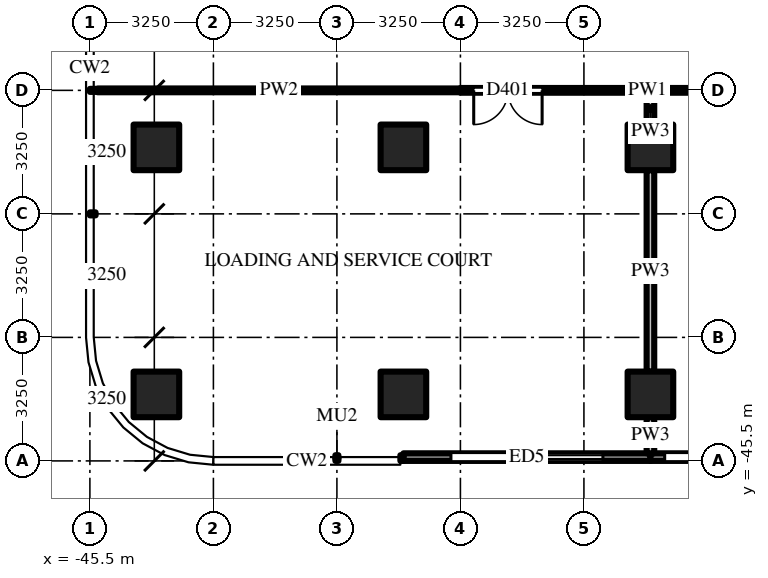
"""IFC4 building model, lengths in metres.
Left out: names, types, materials, properties, quantities, classifications, styles, units other than length and angle.
Written with IfcOpenShell. Run it as: python <this file> out.ifc"""

import sys

from ifc_helpers import new_model, si_unit, direction, frame, frame_2d, origin, origin_2d, place, context, subcontext, project, spatial, rectangle, extrude, source, transform, mapped, element, fill, save


model = new_model("IFC4")
c1 = context("Model", 3, precision=1e-05, world=origin(), true_north=direction((0.0, 1.0)))
c2 = subcontext(c1, "Body", "Model", "MODEL_VIEW")
j1 = project(units=[si_unit("LENGTHUNIT", "METRE"), si_unit("PLANEANGLEUNIT", "RADIAN")], contexts=[c1])
p1 = place(None, origin())
s1 = spatial("IfcSite", under=j1, at=p1, CompositionType="ELEMENT")
p2 = place(p1, origin())
s2 = spatial("IfcBuilding", under=s1, at=p2, CompositionType="ELEMENT")
p3 = place(p2, origin())
s3 = spatial("IfcBuildingStorey", under=s2, at=p3, CompositionType="ELEMENT", Elevation=0.0)
m1 = source(origin(), c2, "Body", "SweptSolid", [
    extrude(rectangle(XDim=1.2, YDim=1.2, at=origin_2d()), origin(), (0.0, 0.0, 1.0), 8.5),
])
for number, where, z_axis, x_axis in (
    (1, (-30.75, -37.25, -0.5), (0.0, 0.0, 1.0), (1.0, 0.0, 0.0)),
    (2, (-30.75, -43.75, -0.5), (0.0, 0.0, 1.0), (1.0, 0.0, 0.0)),
    (3, (-37.25, -37.25, -0.5), (0.0, 0.0, 1.0), (1.0, 0.0, 0.0)),
    (4, (-37.25, -43.75, -0.5), (0.0, 0.0, 1.0), (1.0, 0.0, 0.0)),
    (5, (-43.75, -37.25, -0.5), (0.0, 0.0, 1.0), (1.0, 0.0, 0.0)),
    (6, (-43.75, -43.75, -0.5), (0.0, 0.0, 1.0), (1.0, 0.0, 0.0)),
):
    element("IfcColumn", number, at=place(p3, frame(where, z_axis=z_axis, x_axis=x_axis)), inside=s3, PredefinedType="COLUMN", context=c2, shape_type="MappedRepresentation", body=[
        mapped(m1, transform((0.0, 0.0, 0.0))),
    ])
m2 = source(origin(), c2, "Body", "SweptSolid", [
    extrude(rectangle(XDim=6.5, YDim=0.2, at=frame_2d((3.25, 0.0))), origin(), (0.0, 0.0, 1.0), 7.7),
])
p4 = place(p3, frame((-30.75, -45.4, 0.0), z_axis=(0.0, 0.0, 1.0), x_axis=(-1.0, 0.0, 0.0)))
e7 = element("IfcWall", 7, at=p4, inside=s3, PredefinedType="SOLIDWALL", context=c2, shape_type="MappedRepresentation", body=[
    mapped(m2, transform((0.0, 0.0, 0.0))),
])
m3 = source(origin(), c2, "Body", "SweptSolid", [
    extrude(rectangle(XDim=4.0, YDim=4.5, at=frame_2d((2.0, 2.25))), frame((0.0, 0.11, 0.0), z_axis=(0.0, -1.0, 0.0), x_axis=(1.0, 0.0, 0.0)), (0.0, 0.0, 1.0), 0.22),
])
p5 = place(p4, frame((1.25, 0.0, 0.0)))
e8 = element("IfcOpeningElement", 8, at=p5, cuts=e7, PredefinedType="OPENING", context=c2, shape_type="MappedRepresentation", body=[
    mapped(m3, transform((0.0, 0.0, 0.0))),
])
p6 = place(p3, frame((-26.0, -45.4, 0.0), z_axis=(0.0, 0.0, 1.0), x_axis=(-1.0, 0.0, 0.0)))
e9 = element("IfcWall", 9, at=p6, inside=s3, PredefinedType="SOLIDWALL", context=c2, shape_type="SweptSolid", body=[
    extrude(rectangle(XDim=4.75, YDim=0.2, at=frame_2d((2.375, 0.0))), origin(), (0.0, 0.0, 1.0), 7.7),
])
p7 = place(p6, frame((0.375, 0.0, 0.0)))
e10 = element("IfcOpeningElement", 10, at=p7, cuts=e9, PredefinedType="OPENING", context=c2, shape_type="MappedRepresentation", body=[
    mapped(m3, transform((0.0, 0.0, 0.0))),
])
p8 = place(p3, frame((-30.75, -45.3, 0.0), z_axis=(0.0, 0.0, 1.0), x_axis=(0.0, 1.0, 0.0)))
e11 = element("IfcWall", 11, at=p8, inside=s3, PredefinedType="PARTITIONING", context=c2, shape_type="SweptSolid", body=[
    extrude(rectangle(XDim=0.95, YDim=0.2, at=frame_2d((0.475, 0.0))), origin(), (0.0, 0.0, 1.0), 7.7),
])
p9 = place(p3, frame((-30.75, -43.15, 0.0), z_axis=(0.0, 0.0, 1.0), x_axis=(0.0, 1.0, 0.0)))
e12 = element("IfcWall", 12, at=p9, inside=s3, PredefinedType="PARTITIONING", context=c2, shape_type="SweptSolid", body=[
    extrude(rectangle(XDim=5.3, YDim=0.2, at=frame_2d((2.65, 0.0))), origin(), (0.0, 0.0, 1.0), 6.997),
])
p10 = place(p3, frame((-30.75, -36.65, 0.0), z_axis=(0.0, 0.0, 1.0), x_axis=(0.0, 1.0, 0.0)))
e13 = element("IfcWall", 13, at=p10, inside=s3, PredefinedType="PARTITIONING", context=c2, shape_type="SweptSolid", body=[
    extrude(rectangle(XDim=0.837, YDim=0.2, at=frame_2d((0.419, 0.0))), origin(), (0.0, 0.0, 1.0), 6.997),
])
p11 = place(p3, frame((-45.3, -35.75, 0.0), z_axis=(0.0, 0.0, 1.0), x_axis=(1.0, 0.0, 0.0)))
e14 = element("IfcWall", 14, at=p11, inside=s3, PredefinedType="PARTITIONING", context=c2, shape_type="SweptSolid", body=[
    extrude(rectangle(XDim=9.55, YDim=0.1, at=frame_2d((4.775, 0.0))), origin(), (0.0, 0.0, 1.0), 6.997),
])
m4 = source(origin(), c2, "Body", "SweptSolid", [
    extrude(rectangle(XDim=9.85, YDim=0.125, at=frame_2d((4.925, 0.0))), origin(), (0.0, 0.0, 1.0), 6.997),
])
p12 = place(p3, frame((-25.9, -35.75, 0.0), z_axis=(0.0, 0.0, 1.0), x_axis=(-1.0, 0.0, 0.0)))
e15 = element("IfcWall", 15, at=p12, inside=s3, PredefinedType="PARTITIONING", context=c2, shape_type="MappedRepresentation", body=[
    mapped(m4, transform((0.0, 0.0, 0.0))),
])
m5 = source(origin(), c2, "Body", "SweptSolid", [
    extrude(rectangle(XDim=1.8, YDim=2.1, at=frame_2d((0.9, 1.05))), frame((0.0, 0.073, 0.0), z_axis=(0.0, -1.0, 0.0), x_axis=(1.0, 0.0, 0.0)), (0.0, 0.0, 1.0), 0.145),
])
p13 = place(p12, frame((7.7, 0.0, 0.0)))
e16 = element("IfcOpeningElement", 16, at=p13, cuts=e15, PredefinedType="OPENING", context=c2, shape_type="MappedRepresentation", body=[
    mapped(m5, transform((0.0, 0.0, 0.0))),
])
m6 = source(origin(), c2, "Body", "SweptSolid", [
    extrude(rectangle(XDim=4.0, YDim=4.5, at=frame_2d((2.0, 2.25))), frame((0.0, 0.025, 0.0), z_axis=(0.0, -1.0, 0.0), x_axis=(1.0, 0.0, 0.0)), (0.0, 0.0, 1.0), 0.05),
])
p14 = place(p5, origin())
e17 = element("IfcDoor", 17, at=p14, inside=s3, OperationType="ROLLINGUP", PredefinedType="DOOR", context=c2, shape_type="MappedRepresentation", body=[
    mapped(m6, transform((0.0, 0.0, 0.0))),
])
fill(e8, e17)
p15 = place(p7, origin())
e18 = element("IfcDoor", 18, at=p15, inside=s3, OperationType="ROLLINGUP", PredefinedType="DOOR", context=c2, shape_type="MappedRepresentation", body=[
    mapped(m6, transform((0.0, 0.0, 0.0))),
])
fill(e10, e18)
m7 = source(origin(), c2, "Body", "SweptSolid", [
    extrude(rectangle(XDim=1.8, YDim=2.1, at=frame_2d((0.9, 1.05))), frame((0.0, 0.025, 0.0), z_axis=(0.0, -1.0, 0.0), x_axis=(1.0, 0.0, 0.0)), (0.0, 0.0, 1.0), 0.05),
])
p16 = place(p13, origin())
e19 = element("IfcDoor", 19, at=p16, inside=s3, OperationType="DOUBLE_DOOR_SINGLE_SWING", PredefinedType="DOOR", context=c2, shape_type="MappedRepresentation", body=[
    mapped(m7, transform((0.0, 0.0, 0.0))),
])
fill(e16, e19)
save(model, sys.argv[1])
